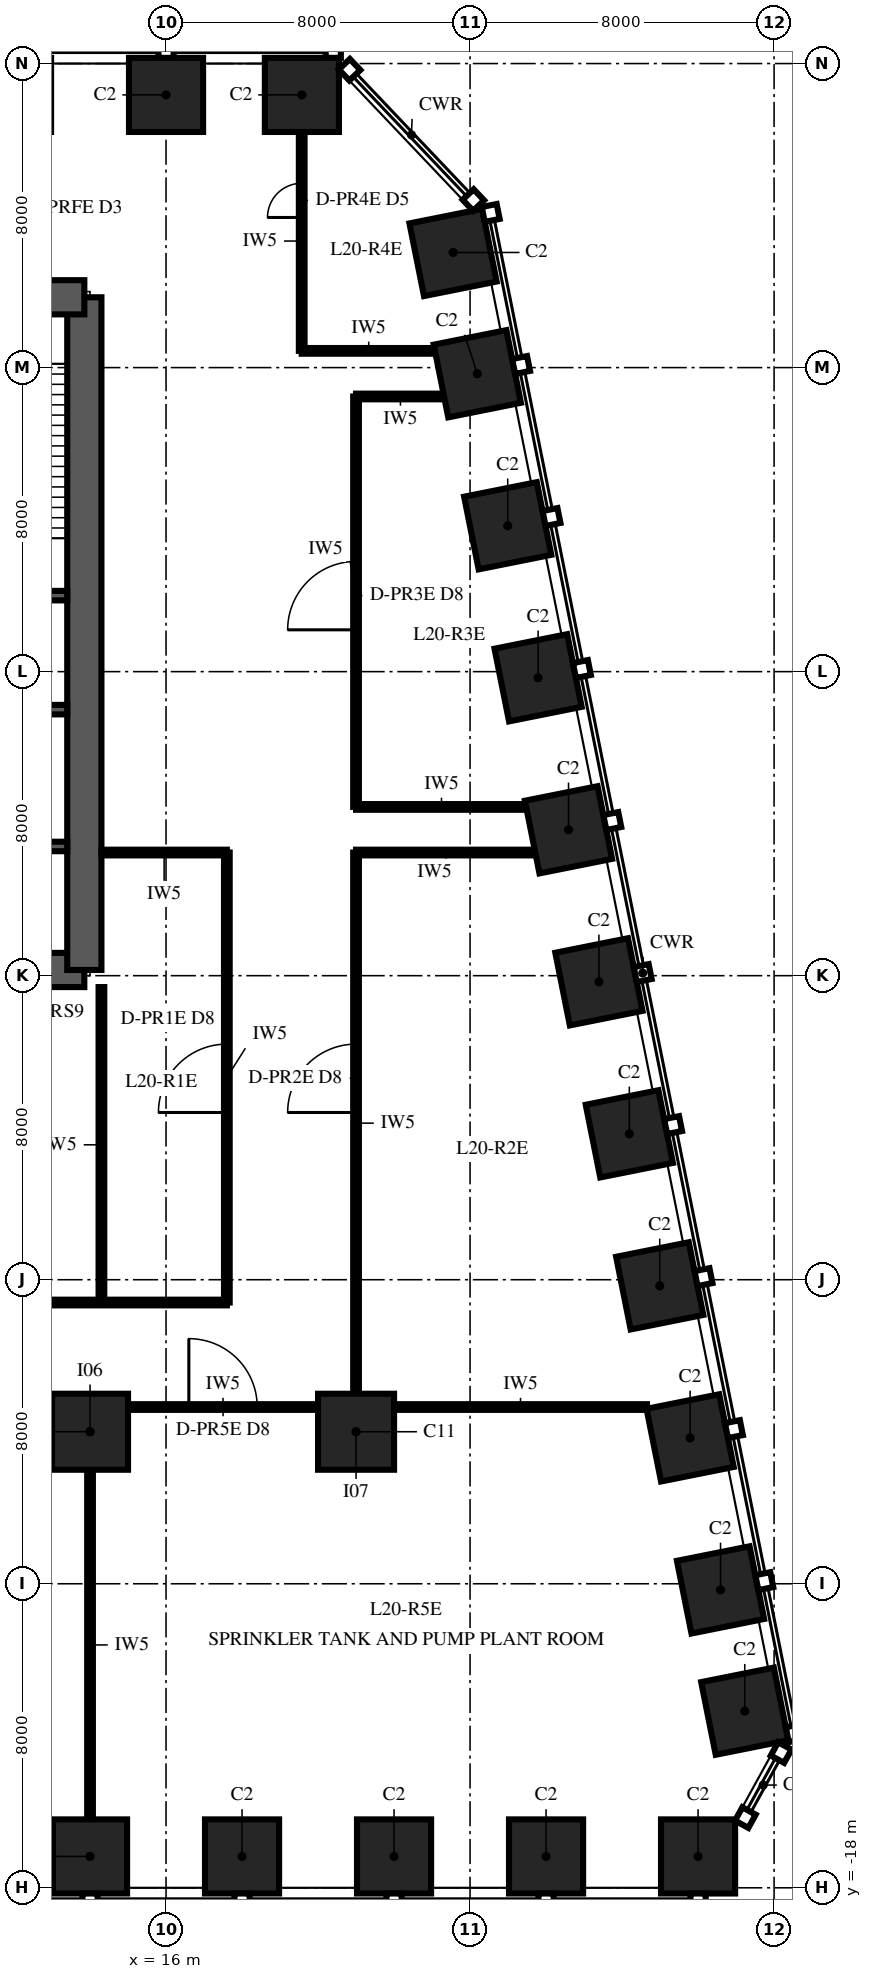
"""IFC4 building model, lengths in metres.
Left out: names, types, materials, properties, quantities, classifications, styles, units other than length and angle.
Written with IfcOpenShell. Run it as: python <this file> out.ifc"""

import sys

from ifc_helpers import new_model, si_unit, direction, frame, frame_2d, origin, origin_2d, place, context, subcontext, project, spatial, polyline, rectangle, outline, extrude, element, fill, save


model = new_model("IFC4")
c1 = context("Model", 3, precision=1e-05, world=origin(), true_north=direction((0.0, 1.0)))
c2 = subcontext(c1, "Body", "Model", "MODEL_VIEW")
j1 = project(units=[si_unit("LENGTHUNIT", "METRE"), si_unit("PLANEANGLEUNIT", "RADIAN")], contexts=[c1])
p1 = place(None, origin())
s1 = spatial("IfcSite", under=j1, at=p1, CompositionType="ELEMENT")
p2 = place(p1, origin())
s2 = spatial("IfcBuilding", under=s1, at=p2, CompositionType="ELEMENT")
p3 = place(p2, frame((0.0, 0.0, 92.0)))
s3 = spatial("IfcBuildingStorey", under=s2, at=p3, CompositionType="ELEMENT", Elevation=92.0)
for number, where, z_axis, x_axis in (
    (1, (14.0, -17.175, 0.0), (0.0, 0.0, 1.0), (1.0, 0.0, 0.0)),
    (2, (18.0, -17.175, 0.0), (0.0, 0.0, 1.0), (1.0, 0.0, 0.0)),
    (3, (22.0, -17.175, 0.0), (0.0, 0.0, 1.0), (1.0, 0.0, 0.0)),
    (4, (26.0, -17.175, 0.0), (0.0, 0.0, 1.0), (1.0, 0.0, 0.0)),
    (5, (30.0, -17.175, 0.0), (0.0, 0.0, 1.0), (1.0, 0.0, 0.0)),
    (6, (31.229, -13.353, 0.0), (0.0, 0.0, 1.0), (-0.196, 0.981, 0.0)),
    (7, (30.591, -10.162, 0.0), (0.0, 0.0, 1.0), (-0.196, 0.981, 0.0)),
    (8, (29.791, -6.162, 0.0), (0.0, 0.0, 1.0), (-0.196, 0.981, 0.0)),
    (9, (28.991, -2.162, 0.0), (0.0, 0.0, 1.0), (-0.196, 0.981, 0.0)),
    (10, (28.191, 1.838, 0.0), (0.0, 0.0, 1.0), (-0.196, 0.981, 0.0)),
    (11, (27.391, 5.838, 0.0), (0.0, 0.0, 1.0), (-0.196, 0.981, 0.0)),
    (12, (26.591, 9.838, 0.0), (0.0, 0.0, 1.0), (-0.196, 0.981, 0.0)),
    (13, (25.791, 13.838, 0.0), (0.0, 0.0, 1.0), (-0.196, 0.981, 0.0)),
    (14, (24.991, 17.838, 0.0), (0.0, 0.0, 1.0), (-0.196, 0.981, 0.0)),
    (15, (24.191, 21.838, 0.0), (0.0, 0.0, 1.0), (-0.196, 0.981, 0.0)),
    (16, (23.553, 25.029, 0.0), (0.0, 0.0, 1.0), (-0.196, 0.981, 0.0)),
    (17, (19.575, 29.175, 0.0), (0.0, 0.0, 1.0), (-1.0, 0.0, 0.0)),
    (18, (16.0, 29.175, 0.0), (0.0, 0.0, 1.0), (-1.0, 0.0, 0.0)),
):
    element("IfcColumn", number, at=place(p3, frame(where, z_axis=z_axis, x_axis=x_axis)), inside=s3, PredefinedType="COLUMN", context=c2, shape_type="SweptSolid", body=[
        extrude(rectangle(XDim=1.95, YDim=1.95, at=origin_2d()), origin(), (0.0, 0.0, 1.0), 6.0),
    ])
for number, where, z_axis, x_axis in (
    (19, (14.0, -6.0, 0.0), (0.0, 0.0, 1.0), (1.0, 0.0, 0.0)),
    (20, (21.0, -6.0, 0.0), (0.0, 0.0, 1.0), (1.0, 0.0, 0.0)),
):
    element("IfcColumn", number, at=place(p3, frame(where, z_axis=z_axis, x_axis=x_axis)), inside=s3, PredefinedType="COLUMN", context=c2, shape_type="SweptSolid", body=[
        extrude(rectangle(XDim=2.0, YDim=2.0, at=origin_2d()), origin(), (0.0, 0.0, 1.0), 6.0),
    ])
p4 = place(p3, frame((-13.85, 6.15, 0.0), z_axis=(0.0, 0.0, 1.0), x_axis=(1.0, 0.0, 0.0)))
e21 = element("IfcWall", 21, at=p4, inside=s3, PredefinedType="SHEAR", context=c2, shape_type="SweptSolid", body=[
    extrude(rectangle(XDim=27.7, YDim=0.9, at=frame_2d((13.85, 0.0))), origin(), (0.0, 0.0, 1.0), 6.0),
])
p5 = place(p3, frame((13.85, 6.15, 0.0), z_axis=(0.0, 0.0, 1.0), x_axis=(0.0, 1.0, 0.0)))
e22 = element("IfcWall", 22, at=p5, inside=s3, PredefinedType="SHEAR", context=c2, shape_type="SweptSolid", body=[
    extrude(outline(polyline([(0.0, -0.45), (17.7, -0.45), (17.7, 0.0), (17.25, 0.0), (17.25, 0.45), (0.45, 0.45), (0.45, 0.0), (0.0, 0.0), (0.0, -0.45)])), origin(), (0.0, 0.0, 1.0), 6.0),
])
p6 = place(p3, frame((13.85, 23.85, 0.0), z_axis=(0.0, 0.0, 1.0), x_axis=(-1.0, 0.0, 0.0)))
e23 = element("IfcWall", 23, at=p6, inside=s3, PredefinedType="SHEAR", context=c2, shape_type="SweptSolid", body=[
    extrude(rectangle(XDim=27.7, YDim=0.9, at=frame_2d((13.85, 0.0))), origin(), (0.0, 0.0, 1.0), 6.0),
])
p7 = place(p6, frame((21.75, 0.0, 0.0)))
e24 = element("IfcOpeningElement", 24, at=p7, cuts=e23, PredefinedType="OPENING", context=c2, shape_type="SweptSolid", body=[
    extrude(rectangle(XDim=1.0, YDim=2.1, at=frame_2d((0.5, 1.05))), frame((0.0, 0.465, 0.0), z_axis=(0.0, -1.0, 0.0), x_axis=(1.0, 0.0, 0.0)), (0.0, 0.0, 1.0), 0.93),
])
p8 = place(p6, frame((4.95, 0.0, 0.0)))
e25 = element("IfcOpeningElement", 25, at=p8, cuts=e23, PredefinedType="OPENING", context=c2, shape_type="SweptSolid", body=[
    extrude(rectangle(XDim=1.0, YDim=2.1, at=frame_2d((0.5, 1.05))), frame((0.0, 0.465, 0.0), z_axis=(0.0, -1.0, 0.0), x_axis=(1.0, 0.0, 0.0)), (0.0, 0.0, 1.0), 0.93),
])
p9 = place(p6, frame((17.35, 0.0, 0.0)))
e26 = element("IfcOpeningElement", 26, at=p9, cuts=e23, PredefinedType="OPENING", context=c2, shape_type="SweptSolid", body=[
    extrude(rectangle(XDim=1.0, YDim=2.1, at=frame_2d((0.5, 1.05))), frame((0.0, 0.465, 0.0), z_axis=(0.0, -1.0, 0.0), x_axis=(1.0, 0.0, 0.0)), (0.0, 0.0, 1.0), 0.93),
])
p10 = place(p6, frame((13.35, 0.0, 0.0)))
e27 = element("IfcOpeningElement", 27, at=p10, cuts=e23, PredefinedType="OPENING", context=c2, shape_type="SweptSolid", body=[
    extrude(rectangle(XDim=1.0, YDim=2.1, at=frame_2d((0.5, 1.05))), frame((0.0, 0.465, 0.0), z_axis=(0.0, -1.0, 0.0), x_axis=(1.0, 0.0, 0.0)), (0.0, 0.0, 1.0), 0.93),
])
p11 = place(p6, frame((9.35, 0.0, 0.0)))
e28 = element("IfcOpeningElement", 28, at=p11, cuts=e23, PredefinedType="OPENING", context=c2, shape_type="SweptSolid", body=[
    extrude(rectangle(XDim=1.0, YDim=2.1, at=frame_2d((0.5, 1.05))), frame((0.0, 0.465, 0.0), z_axis=(0.0, -1.0, 0.0), x_axis=(1.0, 0.0, 0.0)), (0.0, 0.0, 1.0), 0.93),
])
for number, where, z_axis, x_axis in (
    (29, (-13.4, 9.4, 0.0), (0.0, 0.0, 1.0), (1.0, 0.0, 0.0)),
    (30, (-13.4, 13.0, 0.0), (0.0, 0.0, 1.0), (1.0, 0.0, 0.0)),
    (31, (-13.4, 16.0, 0.0), (0.0, 0.0, 1.0), (1.0, 0.0, 0.0)),
):
    element("IfcWall", number, at=place(p3, frame(where, z_axis=z_axis, x_axis=x_axis)), inside=s3, PredefinedType="SHEAR", context=c2, shape_type="SweptSolid", body=[
        extrude(rectangle(XDim=26.8, YDim=0.25, at=frame_2d((13.4, 0.0))), origin(), (0.0, 0.0, 1.0), 6.0),
    ])
p12 = place(p3, frame((17.6, -2.6, 0.0), z_axis=(0.0, 0.0, 1.0), x_axis=(0.0, 1.0, 0.0)))
e32 = element("IfcWall", 32, at=p12, inside=s3, PredefinedType="PARTITIONING", context=c2, shape_type="SweptSolid", body=[
    extrude(rectangle(XDim=11.84, YDim=0.15, at=frame_2d((5.92, 0.0))), origin(), (0.0, 0.0, 1.0), 5.8),
])
p13 = place(p12, frame((5.0, 0.0, 0.0)))
e33 = element("IfcOpeningElement", 33, at=p13, cuts=e32, PredefinedType="OPENING", context=c2, shape_type="SweptSolid", body=[
    extrude(rectangle(XDim=1.8, YDim=2.4, at=frame_2d((0.9, 1.2))), frame((0.0, 0.09, 0.0), z_axis=(0.0, -1.0, 0.0), x_axis=(1.0, 0.0, 0.0)), (0.0, 0.0, 1.0), 0.18),
])
p14 = place(p3, frame((21.0, -5.0, 0.0), z_axis=(0.0, 0.0, 1.0), x_axis=(0.0, 1.0, 0.0)))
e34 = element("IfcWall", 34, at=p14, inside=s3, PredefinedType="PARTITIONING", context=c2, shape_type="SweptSolid", body=[
    extrude(rectangle(XDim=14.24, YDim=0.15, at=frame_2d((7.12, 0.0))), origin(), (0.0, 0.0, 1.0), 5.8),
])
p15 = place(p14, frame((7.4, 0.0, 0.0)))
e35 = element("IfcOpeningElement", 35, at=p15, cuts=e34, PredefinedType="OPENING", context=c2, shape_type="SweptSolid", body=[
    extrude(rectangle(XDim=1.8, YDim=2.4, at=frame_2d((0.9, 1.2))), frame((0.0, 0.09, 0.0), z_axis=(0.0, -1.0, 0.0), x_axis=(1.0, 0.0, 0.0)), (0.0, 0.0, 1.0), 0.18),
])
p16 = place(p3, frame((21.0, 10.44, 0.0), z_axis=(0.0, 0.0, 1.0), x_axis=(0.0, 1.0, 0.0)))
e36 = element("IfcWall", 36, at=p16, inside=s3, PredefinedType="PARTITIONING", context=c2, shape_type="SweptSolid", body=[
    extrude(rectangle(XDim=10.8, YDim=0.15, at=frame_2d((5.4, 0.0))), origin(), (0.0, 0.0, 1.0), 5.8),
])
p17 = place(p16, frame((4.66, 0.0, 0.0)))
e37 = element("IfcOpeningElement", 37, at=p17, cuts=e36, PredefinedType="OPENING", context=c2, shape_type="SweptSolid", body=[
    extrude(rectangle(XDim=1.8, YDim=2.4, at=frame_2d((0.9, 1.2))), frame((0.0, 0.09, 0.0), z_axis=(0.0, -1.0, 0.0), x_axis=(1.0, 0.0, 0.0)), (0.0, 0.0, 1.0), 0.18),
])
p18 = place(p3, frame((14.3, -2.6, 0.0), z_axis=(0.0, 0.0, 1.0), x_axis=(0.0, 1.0, 0.0)))
e38 = element("IfcWall", 38, at=p18, inside=s3, PredefinedType="PARTITIONING", context=c2, shape_type="SweptSolid", body=[
    extrude(rectangle(XDim=8.3, YDim=0.15, at=frame_2d((4.15, 0.0))), origin(), (0.0, 0.0, 1.0), 5.8),
])
p19 = place(p3, frame((14.3, 9.24, 0.0), z_axis=(0.0, 0.0, 1.0), x_axis=(1.0, 0.0, 0.0)))
e39 = element("IfcWall", 39, at=p19, inside=s3, PredefinedType="PARTITIONING", context=c2, shape_type="SweptSolid", body=[
    extrude(rectangle(XDim=3.3, YDim=0.15, at=frame_2d((1.65, 0.0))), origin(), (0.0, 0.0, 1.0), 5.179),
])
p20 = place(p3, frame((21.0, 9.24, 0.0), z_axis=(0.0, 0.0, 1.0), x_axis=(1.0, 0.0, 0.0)))
e40 = element("IfcWall", 40, at=p20, inside=s3, PredefinedType="PARTITIONING", context=c2, shape_type="SweptSolid", body=[
    extrude(rectangle(XDim=4.737, YDim=0.15, at=frame_2d((2.368, 0.0))), origin(), (0.0, 0.0, 1.0), 5.8),
])
p21 = place(p3, frame((21.0, 10.44, 0.0), z_axis=(0.0, 0.0, 1.0), x_axis=(1.0, 0.0, 0.0)))
e41 = element("IfcWall", 41, at=p21, inside=s3, PredefinedType="PARTITIONING", context=c2, shape_type="SweptSolid", body=[
    extrude(rectangle(XDim=4.497, YDim=0.15, at=frame_2d((2.248, 0.0))), origin(), (0.0, 0.0, 1.0), 5.8),
])
p22 = place(p3, frame((21.0, 21.24, 0.0), z_axis=(0.0, 0.0, 1.0), x_axis=(1.0, 0.0, 0.0)))
e42 = element("IfcWall", 42, at=p22, inside=s3, PredefinedType="PARTITIONING", context=c2, shape_type="SweptSolid", body=[
    extrude(rectangle(XDim=2.337, YDim=0.15, at=frame_2d((1.168, 0.0))), origin(), (0.0, 0.0, 1.0), 5.8),
])
p23 = place(p3, frame((19.57, 22.44, 0.0), z_axis=(0.0, 0.0, 1.0), x_axis=(1.0, 0.0, 0.0)))
e43 = element("IfcWall", 43, at=p23, inside=s3, PredefinedType="PARTITIONING", context=c2, shape_type="SweptSolid", body=[
    extrude(rectangle(XDim=3.527, YDim=0.15, at=frame_2d((1.763, 0.0))), origin(), (0.0, 0.0, 1.0), 5.8),
])
p24 = place(p3, frame((19.57, 22.44, 0.0), z_axis=(0.0, 0.0, 1.0), x_axis=(0.0, 1.0, 0.0)))
e44 = element("IfcWall", 44, at=p24, inside=s3, PredefinedType="PARTITIONING", context=c2, shape_type="SweptSolid", body=[
    extrude(rectangle(XDim=5.78, YDim=0.15, at=frame_2d((2.89, 0.0))), origin(), (0.0, 0.0, 1.0), 5.368),
])
p25 = place(p24, frame((3.51, 0.0, 0.0)))
e45 = element("IfcOpeningElement", 45, at=p25, cuts=e44, PredefinedType="OPENING", context=c2, shape_type="SweptSolid", body=[
    extrude(rectangle(XDim=0.9, YDim=2.1, at=frame_2d((0.45, 1.05))), frame((0.0, 0.09, 0.0), z_axis=(0.0, -1.0, 0.0), x_axis=(1.0, 0.0, 0.0)), (0.0, 0.0, 1.0), 0.18),
])
p26 = place(p3, frame((14.0, -7.0, 0.0), z_axis=(0.0, 0.0, 1.0), x_axis=(0.0, -1.0, 0.0)))
e46 = element("IfcWall", 46, at=p26, inside=s3, PredefinedType="PARTITIONING", context=c2, shape_type="SweptSolid", body=[
    extrude(rectangle(XDim=9.22, YDim=0.15, at=frame_2d((4.61, 0.0))), origin(), (0.0, 0.0, 1.0), 5.179),
])
p27 = place(p3, frame((15.0, -5.35, 0.0), z_axis=(0.0, 0.0, 1.0), x_axis=(1.0, 0.0, 0.0)))
e47 = element("IfcWall", 47, at=p27, inside=s3, PredefinedType="PARTITIONING", context=c2, shape_type="SweptSolid", body=[
    extrude(rectangle(XDim=5.0, YDim=0.15, at=frame_2d((2.5, 0.0))), origin(), (0.0, 0.0, 1.0), 5.8),
])
p28 = place(p27, frame((1.6, 0.0, 0.0)))
e48 = element("IfcOpeningElement", 48, at=p28, cuts=e47, PredefinedType="OPENING", context=c2, shape_type="SweptSolid", body=[
    extrude(rectangle(XDim=1.8, YDim=2.4, at=frame_2d((0.9, 1.2))), frame((0.0, 0.09, 0.0), z_axis=(0.0, -1.0, 0.0), x_axis=(1.0, 0.0, 0.0)), (0.0, 0.0, 1.0), 0.18),
])
p29 = place(p3, frame((22.0, -5.35, 0.0), z_axis=(0.0, 0.0, 1.0), x_axis=(1.0, 0.0, 0.0)))
e49 = element("IfcWall", 49, at=p29, inside=s3, PredefinedType="PARTITIONING", context=c2, shape_type="SweptSolid", body=[
    extrude(rectangle(XDim=6.655, YDim=0.15, at=frame_2d((3.327, 0.0))), origin(), (0.0, 0.0, 1.0), 5.8),
])
p30 = place(p3, frame((-17.6, -2.6, 0.0), z_axis=(0.0, 0.0, 1.0), x_axis=(1.0, 0.0, 0.0)))
e50 = element("IfcWall", 50, at=p30, inside=s3, PredefinedType="PARTITIONING", context=c2, shape_type="SweptSolid", body=[
    extrude(rectangle(XDim=35.2, YDim=0.15, at=frame_2d((17.6, 0.0))), origin(), (0.0, 0.0, 1.0), 5.8),
])
p31 = place(p30, frame((13.7, 0.0, 0.0)))
e51 = element("IfcOpeningElement", 51, at=p31, cuts=e50, PredefinedType="OPENING", context=c2, shape_type="SweptSolid", body=[
    extrude(rectangle(XDim=1.8, YDim=2.4, at=frame_2d((0.9, 1.2))), frame((0.0, 0.09, 0.0), z_axis=(0.0, -1.0, 0.0), x_axis=(1.0, 0.0, 0.0)), (0.0, 0.0, 1.0), 0.18),
])
p32 = place(p13, origin())
e52 = element("IfcDoor", 52, at=p32, inside=s3, OperationType="DOUBLE_DOOR_SINGLE_SWING", PredefinedType="DOOR", context=c2, shape_type="SweptSolid", body=[
    extrude(rectangle(XDim=1.8, YDim=2.4, at=frame_2d((0.9, 1.2))), frame((0.0, 0.075, 0.0), z_axis=(0.0, -1.0, 0.0), x_axis=(1.0, 0.0, 0.0)), (0.0, 0.0, 1.0), 0.149),
])
fill(e33, e52)
p33 = place(p15, origin())
e53 = element("IfcDoor", 53, at=p33, inside=s3, OperationType="DOUBLE_DOOR_SINGLE_SWING", PredefinedType="DOOR", context=c2, shape_type="SweptSolid", body=[
    extrude(rectangle(XDim=1.8, YDim=2.4, at=frame_2d((0.9, 1.2))), frame((0.0, 0.075, 0.0), z_axis=(0.0, -1.0, 0.0), x_axis=(1.0, 0.0, 0.0)), (0.0, 0.0, 1.0), 0.149),
])
fill(e35, e53)
p34 = place(p17, origin())
e54 = element("IfcDoor", 54, at=p34, inside=s3, OperationType="DOUBLE_DOOR_SINGLE_SWING", PredefinedType="DOOR", context=c2, shape_type="SweptSolid", body=[
    extrude(rectangle(XDim=1.8, YDim=2.4, at=frame_2d((0.9, 1.2))), frame((0.0, 0.075, 0.0), z_axis=(0.0, -1.0, 0.0), x_axis=(1.0, 0.0, 0.0)), (0.0, 0.0, 1.0), 0.149),
])
fill(e37, e54)
p35 = place(p25, origin())
e55 = element("IfcDoor", 55, at=p35, inside=s3, OperationType="SINGLE_SWING_LEFT", PredefinedType="DOOR", context=c2, shape_type="SweptSolid", body=[
    extrude(rectangle(XDim=0.9, YDim=2.1, at=frame_2d((0.45, 1.05))), frame((0.0, 0.075, 0.0), z_axis=(0.0, -1.0, 0.0), x_axis=(1.0, 0.0, 0.0)), (0.0, 0.0, 1.0), 0.149),
])
fill(e45, e55)
p36 = place(p28, origin())
e56 = element("IfcDoor", 56, at=p36, inside=s3, OperationType="DOUBLE_DOOR_SINGLE_SWING", PredefinedType="DOOR", context=c2, shape_type="SweptSolid", body=[
    extrude(rectangle(XDim=1.8, YDim=2.4, at=frame_2d((0.9, 1.2))), frame((0.0, 0.075, 0.0), z_axis=(0.0, -1.0, 0.0), x_axis=(1.0, 0.0, 0.0)), (0.0, 0.0, 1.0), 0.149),
])
fill(e48, e56)
save(model, sys.argv[1])
